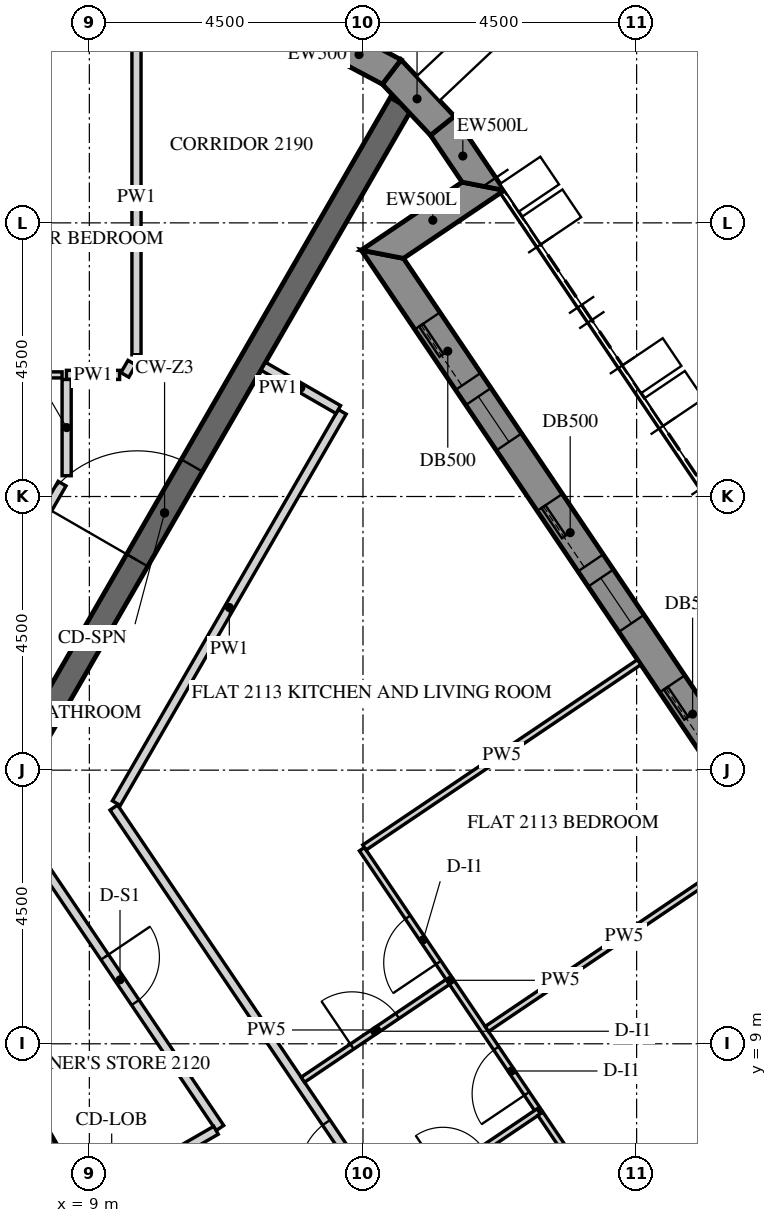
"""IFC4 building model, lengths in metres.
Left out: names, types, materials, properties, quantities, classifications, styles, units other than length and angle.
Written with IfcOpenShell. Run it as: python <this file> out.ifc"""

import sys

from ifc_helpers import new_model, si_unit, direction, frame, frame_2d, origin, place, context, subcontext, project, spatial, polyline, rectangle, outline, extrude, element, fill, save


model = new_model("IFC4")
c1 = context("Model", 3, precision=1e-05, world=origin(), true_north=direction((0.0, 1.0)))
c2 = subcontext(c1, "Body", "Model", "MODEL_VIEW")
j1 = project(units=[si_unit("LENGTHUNIT", "METRE"), si_unit("PLANEANGLEUNIT", "RADIAN")], contexts=[c1])
p1 = place(None, origin())
s1 = spatial("IfcSite", under=j1, at=p1, CompositionType="ELEMENT")
p2 = place(p1, origin())
s2 = spatial("IfcBuilding", under=s1, at=p2, CompositionType="ELEMENT")
p3 = place(p2, frame((0.0, 0.0, 267.9)))
s3 = spatial("IfcBuildingStorey", under=s2, at=p3, CompositionType="ELEMENT", Elevation=267.9)
p4 = place(p3, frame((26.706, 2.879, -0.15), z_axis=(0.0, 0.0, 1.0), x_axis=(-0.559197891507, 0.829034208061, 0.0)))
e1 = element("IfcWall", 1, at=p4, inside=s3, PredefinedType="SOLIDWALL", context=c2, shape_type="SweptSolid", body=[
    extrude(outline(polyline([(0.25, -0.25), (22.795, -0.25), (23.295, 0.25), (-0.25, 0.25), (0.25, -0.25)])), origin(), (0.0, 0.0, 1.0), 3.9),
])
p5 = place(p4, frame((1.323, 0.0, 1.05)))
e2 = element("IfcOpeningElement", 2, at=p5, cuts=e1, PredefinedType="OPENING", context=c2, shape_type="SweptSolid", body=[
    extrude(rectangle(XDim=0.9, YDim=1.5, at=frame_2d((0.45, 0.75))), frame((0.0, 0.26, 0.0), z_axis=(0.0, -1.0, 0.0), x_axis=(1.0, 0.0, 0.0)), (0.0, 0.0, 1.0), 0.52),
])
p6 = place(p4, frame((2.522, 0.0, 0.15)))
e3 = element("IfcOpeningElement", 3, at=p6, cuts=e1, PredefinedType="OPENING", context=c2, shape_type="SweptSolid", body=[
    extrude(rectangle(XDim=1.2, YDim=2.4, at=frame_2d((0.6, 1.2))), frame((0.0, 0.26, 0.0), z_axis=(0.0, -1.0, 0.0), x_axis=(1.0, 0.0, 0.0)), (0.0, 0.0, 1.0), 0.52),
])
p7 = place(p4, frame((4.922, 0.0, 1.05)))
e4 = element("IfcOpeningElement", 4, at=p7, cuts=e1, PredefinedType="OPENING", context=c2, shape_type="SweptSolid", body=[
    extrude(rectangle(XDim=0.9, YDim=1.5, at=frame_2d((0.45, 0.75))), frame((0.0, 0.26, 0.0), z_axis=(0.0, -1.0, 0.0), x_axis=(1.0, 0.0, 0.0)), (0.0, 0.0, 1.0), 0.52),
])
p8 = place(p4, frame((6.122, 0.0, 0.15)))
e5 = element("IfcOpeningElement", 5, at=p8, cuts=e1, PredefinedType="OPENING", context=c2, shape_type="SweptSolid", body=[
    extrude(rectangle(XDim=1.2, YDim=2.4, at=frame_2d((0.6, 1.2))), frame((0.0, 0.26, 0.0), z_axis=(0.0, -1.0, 0.0), x_axis=(1.0, 0.0, 0.0)), (0.0, 0.0, 1.0), 0.52),
])
p9 = place(p4, frame((8.522, 0.0, 1.05)))
e6 = element("IfcOpeningElement", 6, at=p9, cuts=e1, PredefinedType="OPENING", context=c2, shape_type="SweptSolid", body=[
    extrude(rectangle(XDim=0.9, YDim=1.5, at=frame_2d((0.45, 0.75))), frame((0.0, 0.26, 0.0), z_axis=(0.0, -1.0, 0.0), x_axis=(1.0, 0.0, 0.0)), (0.0, 0.0, 1.0), 0.52),
])
p10 = place(p4, frame((9.722, 0.0, 0.15)))
e7 = element("IfcOpeningElement", 7, at=p10, cuts=e1, PredefinedType="OPENING", context=c2, shape_type="SweptSolid", body=[
    extrude(rectangle(XDim=1.2, YDim=2.4, at=frame_2d((0.6, 1.2))), frame((0.0, 0.26, 0.0), z_axis=(0.0, -1.0, 0.0), x_axis=(1.0, 0.0, 0.0)), (0.0, 0.0, 1.0), 0.52),
])
p11 = place(p4, frame((12.122, 0.0, 1.05)))
e8 = element("IfcOpeningElement", 8, at=p11, cuts=e1, PredefinedType="OPENING", context=c2, shape_type="SweptSolid", body=[
    extrude(rectangle(XDim=0.9, YDim=1.5, at=frame_2d((0.45, 0.75))), frame((0.0, 0.26, 0.0), z_axis=(0.0, -1.0, 0.0), x_axis=(1.0, 0.0, 0.0)), (0.0, 0.0, 1.0), 0.52),
])
p12 = place(p4, frame((13.323, 0.0, 0.15)))
e9 = element("IfcOpeningElement", 9, at=p12, cuts=e1, PredefinedType="OPENING", context=c2, shape_type="SweptSolid", body=[
    extrude(rectangle(XDim=1.2, YDim=2.4, at=frame_2d((0.6, 1.2))), frame((0.0, 0.26, 0.0), z_axis=(0.0, -1.0, 0.0), x_axis=(1.0, 0.0, 0.0)), (0.0, 0.0, 1.0), 0.52),
])
p13 = place(p4, frame((15.722, 0.0, 1.05)))
e10 = element("IfcOpeningElement", 10, at=p13, cuts=e1, PredefinedType="OPENING", context=c2, shape_type="SweptSolid", body=[
    extrude(rectangle(XDim=0.9, YDim=1.5, at=frame_2d((0.45, 0.75))), frame((0.0, 0.26, 0.0), z_axis=(0.0, -1.0, 0.0), x_axis=(1.0, 0.0, 0.0)), (0.0, 0.0, 1.0), 0.52),
])
p14 = place(p4, frame((16.922, 0.0, 0.15)))
e11 = element("IfcOpeningElement", 11, at=p14, cuts=e1, PredefinedType="OPENING", context=c2, shape_type="SweptSolid", body=[
    extrude(rectangle(XDim=1.2, YDim=2.4, at=frame_2d((0.6, 1.2))), frame((0.0, 0.26, 0.0), z_axis=(0.0, -1.0, 0.0), x_axis=(1.0, 0.0, 0.0)), (0.0, 0.0, 1.0), 0.52),
])
p15 = place(p4, frame((19.323, 0.0, 1.05)))
e12 = element("IfcOpeningElement", 12, at=p15, cuts=e1, PredefinedType="OPENING", context=c2, shape_type="SweptSolid", body=[
    extrude(rectangle(XDim=0.9, YDim=1.5, at=frame_2d((0.45, 0.75))), frame((0.0, 0.26, 0.0), z_axis=(0.0, -1.0, 0.0), x_axis=(1.0, 0.0, 0.0)), (0.0, 0.0, 1.0), 0.52),
])
p16 = place(p4, frame((20.522, 0.0, 0.15)))
e13 = element("IfcOpeningElement", 13, at=p16, cuts=e1, PredefinedType="OPENING", context=c2, shape_type="SweptSolid", body=[
    extrude(rectangle(XDim=1.2, YDim=2.4, at=frame_2d((0.6, 1.2))), frame((0.0, 0.26, 0.0), z_axis=(0.0, -1.0, 0.0), x_axis=(1.0, 0.0, 0.0)), (0.0, 0.0, 1.0), 0.52),
])
p17 = place(p3, frame((13.819, 21.984, -0.15), z_axis=(0.0, 0.0, 1.0), x_axis=(0.829052389485, 0.559170935841, 0.0)))
e14 = element("IfcWall", 14, at=p17, inside=s3, PredefinedType="SOLIDWALL", context=c2, shape_type="SweptSolid", body=[
    extrude(outline(polyline([(0.25, -0.25), (2.25, -0.25), (1.75, 0.25), (-0.25, 0.25), (0.25, -0.25)])), origin(), (0.0, 0.0, 1.0), 3.9),
])
p18 = place(p3, frame((15.478, 23.102, -0.15), z_axis=(0.0, 0.0, 1.0), x_axis=(-0.559245726333, 0.829001940636, 0.0)))
e15 = element("IfcWall", 15, at=p18, inside=s3, PredefinedType="SOLIDWALL", context=c2, shape_type="SweptSolid", body=[
    extrude(outline(polyline([(-0.25, -0.25), (1.221, -0.25), (1.18, 0.25), (0.25, 0.25), (-0.25, -0.25)])), origin(), (0.0, 0.0, 1.0), 3.9),
])
p19 = place(p3, frame((14.806, 24.097, -0.15), z_axis=(0.0, 0.0, 1.0), x_axis=(-0.686234452793, 0.727380420275, 0.0)))
e16 = element("IfcWall", 16, at=p19, inside=s3, PredefinedType="SOLIDWALL", context=c2, shape_type="SweptSolid", body=[
    extrude(outline(polyline([(-0.021, -0.25), (1.257, -0.25), (1.175, 0.25), (0.021, 0.25), (-0.021, -0.25)])), origin(), (0.0, 0.0, 1.0), 3.9),
])
p20 = place(p3, frame((13.972, 24.982, -0.15), z_axis=(0.0, 0.0, 1.0), x_axis=(-0.882902492938, 0.469556373575, 0.0)))
e17 = element("IfcWall", 17, at=p20, inside=s3, PredefinedType="SOLIDWALL", context=c2, shape_type="SweptSolid", body=[
    extrude(outline(polyline([(-0.041, -0.25), (1.257, -0.25), (1.175, 0.25), (0.041, 0.25), (-0.041, -0.25)])), origin(), (0.0, 0.0, 1.0), 3.9),
])
p21 = place(p3, frame((12.471, 0.0, -0.15), z_axis=(0.0, 0.0, 1.0), x_axis=(-0.499996419489, 0.866027470984, 0.0)))
e18 = element("IfcWall", 18, at=p21, inside=s3, PredefinedType="SHEAR", context=c2, shape_type="SweptSolid", body=[
    extrude(outline(polyline([(-0.115, -0.2), (12.586, -0.2), (12.355, 0.2), (0.115, 0.2), (-0.115, -0.2)])), origin(), (0.0, 0.0, 1.0), 3.9),
])
p22 = place(p21, frame((5.306, 0.0, 0.15)))
e19 = element("IfcOpeningElement", 19, at=p22, cuts=e18, PredefinedType="OPENING", context=c2, shape_type="SweptSolid", body=[
    extrude(rectangle(XDim=1.8, YDim=2.4, at=frame_2d((0.9, 1.2))), frame((0.0, 0.21, 0.0), z_axis=(0.0, -1.0, 0.0), x_axis=(1.0, 0.0, 0.0)), (0.0, 0.0, 1.0), 0.42),
])
p23 = place(p3, frame((6.351, 11.0, -0.15), z_axis=(0.0, 0.0, 1.0), x_axis=(0.499998894578, 0.866026041999, 0.0)))
e20 = element("IfcWall", 20, at=p23, inside=s3, PredefinedType="SHEAR", context=c2, shape_type="SweptSolid", body=[
    extrude(rectangle(XDim=15.544, YDim=0.4, at=frame_2d((7.772, 0.0))), origin(), (0.0, 0.0, 1.0), 3.9),
])
p24 = place(p23, frame((6.872, 0.0, 0.15)))
e21 = element("IfcOpeningElement", 21, at=p24, cuts=e20, PredefinedType="OPENING", context=c2, shape_type="SweptSolid", body=[
    extrude(rectangle(XDim=1.8, YDim=2.4, at=frame_2d((0.9, 1.2))), frame((0.0, 0.21, 0.0), z_axis=(0.0, -1.0, 0.0), x_axis=(1.0, 0.0, 0.0)), (0.0, 0.0, 1.0), 0.42),
])
p25 = place(p3, frame((9.775, 25.5, 0.0), z_axis=(0.0, 0.0, 1.0), x_axis=(0.0, -1.0, 0.0)))
e22 = element("IfcWall", 22, at=p25, inside=s3, PredefinedType="PARTITIONING", context=c2, shape_type="SweptSolid", body=[
    extrude(rectangle(XDim=5.169, YDim=0.15, at=frame_2d((2.584, 0.0))), origin(), (0.0, 0.0, 1.0), 2.988),
])
p26 = place(p3, frame((9.7, 20.201, 0.0), z_axis=(0.0, 0.0, 1.0), x_axis=(-0.500207565094, -0.865905532852, 0.0)))
e23 = element("IfcWall", 23, at=p26, inside=s3, PredefinedType="PARTITIONING", context=c2, shape_type="SweptSolid", body=[
    extrude(rectangle(XDim=0.232, YDim=0.15, at=frame_2d((0.116, 0.0))), origin(), (0.0, 0.0, 1.0), 2.988),
])
p27 = place(p3, frame((9.497, 20.0, 0.0), z_axis=(0.0, 0.0, 1.0), x_axis=(-1.0, 0.0, 0.0)))
e24 = element("IfcWall", 24, at=p27, inside=s3, PredefinedType="PARTITIONING", context=c2, shape_type="SweptSolid", body=[
    extrude(rectangle(XDim=0.874, YDim=0.15, at=frame_2d((0.437, 0.0))), origin(), (0.0, 0.0, 1.0), 2.988),
])
p28 = place(p3, frame((8.627, 19.925, 0.0), z_axis=(0.0, 0.0, 1.0), x_axis=(0.0, -1.0, 0.0)))
e25 = element("IfcWall", 25, at=p28, inside=s3, PredefinedType="PARTITIONING", context=c2, shape_type="SweptSolid", body=[
    extrude(rectangle(XDim=1.583, YDim=0.15, at=frame_2d((0.792, 0.0))), origin(), (0.0, 0.0, 1.0), 2.988),
])
p29 = place(p3, frame((8.552, 18.212, 0.0), z_axis=(0.0, 0.0, 1.0), x_axis=(-0.499959175164, -0.866048972731, 0.0)))
e26 = element("IfcWall", 26, at=p29, inside=s3, PredefinedType="PARTITIONING", context=c2, shape_type="SweptSolid", body=[
    extrude(rectangle(XDim=2.53, YDim=0.15, at=frame_2d((1.265, 0.0))), origin(), (0.0, 0.0, 1.0), 2.988),
])
p30 = place(p3, frame((18.875, -1.158, 0.0), z_axis=(0.0, 0.0, 1.0), x_axis=(-0.55919880344, 0.829033592945, 0.0)))
e27 = element("IfcWall", 27, at=p30, inside=s3, PredefinedType="PARTITIONING", context=c2, shape_type="SweptSolid", body=[
    extrude(rectangle(XDim=16.939, YDim=0.15, at=frame_2d((8.47, 0.0))), origin(), (0.0, 0.0, 1.0), 2.988),
])
p31 = place(p30, frame((9.69, 0.0, 0.0)))
e28 = element("IfcOpeningElement", 28, at=p31, cuts=e27, PredefinedType="OPENING", context=c2, shape_type="SweptSolid", body=[
    extrude(rectangle(XDim=1.0, YDim=2.1, at=frame_2d((0.5, 1.05))), frame((0.0, 0.085, 0.0), z_axis=(0.0, -1.0, 0.0), x_axis=(1.0, 0.0, 0.0)), (0.0, 0.0, 1.0), 0.17),
])
p32 = place(p3, frame((9.444, 12.957, 0.0), z_axis=(0.0, 0.0, 1.0), x_axis=(0.500004967958, 0.866022535513, 0.0)))
e29 = element("IfcWall", 29, at=p32, inside=s3, PredefinedType="PARTITIONING", context=c2, shape_type="SweptSolid", body=[
    extrude(rectangle(XDim=7.431, YDim=0.15, at=frame_2d((3.715, 0.0))), origin(), (0.0, 0.0, 1.0), 2.988),
])
p33 = place(p3, frame((13.094, 19.43, 0.0), z_axis=(0.0, 0.0, 1.0), x_axis=(-0.866062911188, 0.499935029643, 0.0)))
e30 = element("IfcWall", 30, at=p33, inside=s3, PredefinedType="PARTITIONING", context=c2, shape_type="SweptSolid", body=[
    extrude(rectangle(XDim=1.425, YDim=0.15, at=frame_2d((0.712, 0.0))), origin(), (0.0, 0.0, 1.0), 2.988),
])
p34 = place(p3, frame((7.861, 12.488, 0.0), z_axis=(0.0, 0.0, 1.0), x_axis=(0.559178186788, -0.829047498893, 0.0)))
e31 = element("IfcWall", 31, at=p34, inside=s3, PredefinedType="PARTITIONING", context=c2, shape_type="SweptSolid", body=[
    extrude(rectangle(XDim=5.878, YDim=0.15, at=frame_2d((2.939, 0.0))), origin(), (0.0, 0.0, 1.0), 2.988),
])
p35 = place(p34, frame((2.489, 0.0, 0.0)))
e32 = element("IfcOpeningElement", 32, at=p35, cuts=e31, PredefinedType="OPENING", context=c2, shape_type="SweptSolid", body=[
    extrude(rectangle(XDim=0.9, YDim=2.1, at=frame_2d((0.45, 1.05))), frame((0.0, 0.085, 0.0), z_axis=(0.0, -1.0, 0.0), x_axis=(1.0, 0.0, 0.0)), (0.0, 0.0, 1.0), 0.17),
])
p36 = place(p3, frame((11.082, 7.578, 0.0), z_axis=(0.0, 0.0, 1.0), x_axis=(-0.865993065409, -0.500056007527, 0.0)))
e33 = element("IfcWall", 33, at=p36, inside=s3, PredefinedType="PARTITIONING", context=c2, shape_type="SweptSolid", body=[
    extrude(rectangle(XDim=2.386, YDim=0.15, at=frame_2d((1.193, 0.0))), origin(), (0.0, 0.0, 1.0), 2.988),
])
p37 = place(p3, frame((6.677, 20.0, 0.0), z_axis=(0.0, 0.0, 1.0), x_axis=(1.0, 0.0, 0.0)))
e34 = element("IfcWall", 34, at=p37, inside=s3, PredefinedType="PARTITIONING", context=c2, shape_type="SweptSolid", body=[
    extrude(rectangle(XDim=1.875, YDim=0.1, at=frame_2d((0.938, 0.0))), origin(), (0.0, 0.0, 1.0), 2.988),
])
p38 = place(p3, frame((22.069, 9.307, 0.0), z_axis=(0.0, 0.0, 1.0), x_axis=(-0.829046823816, -0.559179187668, 0.0)))
e35 = element("IfcWall", 35, at=p38, inside=s3, PredefinedType="PARTITIONING", context=c2, shape_type="SweptSolid", body=[
    extrude(rectangle(XDim=8.425, YDim=0.18, at=frame_2d((4.213, 0.0))), origin(), (0.0, 0.0, 1.0), 2.988),
])
p39 = place(p3, frame((12.511, 8.409, 0.0), z_axis=(0.0, 0.0, 1.0), x_axis=(0.829072128826, 0.559141668278, 0.0)))
e36 = element("IfcWall", 36, at=p39, inside=s3, PredefinedType="PARTITIONING", context=c2, shape_type="SweptSolid", body=[
    extrude(rectangle(XDim=2.925, YDim=0.1, at=frame_2d((1.462, 0.0))), origin(), (0.0, 0.0, 1.0), 2.988),
])
p40 = place(p39, frame((0.975, 0.0, 0.0)))
e37 = element("IfcOpeningElement", 37, at=p40, cuts=e36, PredefinedType="OPENING", context=c2, shape_type="SweptSolid", body=[
    extrude(rectangle(XDim=0.9, YDim=2.1, at=frame_2d((0.45, 1.05))), frame((0.0, 0.06, 0.0), z_axis=(0.0, -1.0, 0.0), x_axis=(1.0, 0.0, 0.0)), (0.0, 0.0, 1.0), 0.12),
])
p41 = place(p3, frame((16.392, 7.888, 0.0), z_axis=(0.0, 0.0, 1.0), x_axis=(-0.559208437152, 0.829027094743, 0.0)))
e38 = element("IfcWall", 38, at=p41, inside=s3, PredefinedType="PARTITIONING", context=c2, shape_type="SweptSolid", body=[
    extrude(rectangle(XDim=5.202, YDim=0.1, at=frame_2d((2.601, 0.0))), origin(), (0.0, 0.0, 1.0), 2.988),
])
p42 = place(p41, frame((0.352, 0.0, 0.0)))
e39 = element("IfcOpeningElement", 39, at=p42, cuts=e38, PredefinedType="OPENING", context=c2, shape_type="SweptSolid", body=[
    extrude(rectangle(XDim=0.9, YDim=2.1, at=frame_2d((0.45, 1.05))), frame((0.0, 0.06, 0.0), z_axis=(0.0, -1.0, 0.0), x_axis=(1.0, 0.0, 0.0)), (0.0, 0.0, 1.0), 0.12),
])
p43 = place(p41, frame((2.952, 0.0, 0.0)))
e40 = element("IfcOpeningElement", 40, at=p43, cuts=e38, PredefinedType="OPENING", context=c2, shape_type="SweptSolid", body=[
    extrude(rectangle(XDim=0.9, YDim=2.1, at=frame_2d((0.45, 1.05))), frame((0.0, 0.06, 0.0), z_axis=(0.0, -1.0, 0.0), x_axis=(1.0, 0.0, 0.0)), (0.0, 0.0, 1.0), 0.12),
])
p44 = place(p3, frame((13.524, 12.229, 0.0), z_axis=(0.0, 0.0, 1.0), x_axis=(0.829026245862, 0.559209695617, 0.0)))
e41 = element("IfcWall", 41, at=p44, inside=s3, PredefinedType="PARTITIONING", context=c2, shape_type="SweptSolid", body=[
    extrude(rectangle(XDim=5.45, YDim=0.1, at=frame_2d((2.725, 0.0))), origin(), (0.0, 0.0, 1.0), 2.988),
])
p45 = place(p3, frame((13.966, 6.254, 0.0), z_axis=(0.0, 0.0, 1.0), x_axis=(0.829046031219, 0.559180362781, 0.0)))
e42 = element("IfcWall", 42, at=p45, inside=s3, PredefinedType="PARTITIONING", context=c2, shape_type="SweptSolid", body=[
    extrude(rectangle(XDim=2.925, YDim=0.1, at=frame_2d((1.462, 0.0))), origin(), (0.0, 0.0, 1.0), 2.988),
])
p46 = place(p45, frame((1.025, 0.0, 0.0)))
e43 = element("IfcOpeningElement", 43, at=p46, cuts=e42, PredefinedType="OPENING", context=c2, shape_type="SweptSolid", body=[
    extrude(rectangle(XDim=0.8, YDim=2.1, at=frame_2d((0.4, 1.05))), frame((0.0, 0.06, 0.0), z_axis=(0.0, -1.0, 0.0), x_axis=(1.0, 0.0, 0.0)), (0.0, 0.0, 1.0), 0.12),
])
p47 = place(p3, frame((17.458, 6.306, 0.0), z_axis=(0.0, 0.0, 1.0), x_axis=(-0.559200351269, 0.829032548903, 0.0)))
e44 = element("IfcWall", 44, at=p47, inside=s3, PredefinedType="PARTITIONING", context=c2, shape_type="SweptSolid", body=[
    extrude(rectangle(XDim=1.862, YDim=0.1, at=frame_2d((0.931, 0.0))), origin(), (0.0, 0.0, 1.0), 2.988),
])
p48 = place(p3, frame((20.055, 12.292, 0.0), z_axis=(0.0, 0.0, 1.0), x_axis=(-0.829040254016, -0.559188928021, 0.0)))
e45 = element("IfcWall", 45, at=p48, inside=s3, PredefinedType="PARTITIONING", context=c2, shape_type="SweptSolid", body=[
    extrude(rectangle(XDim=5.45, YDim=0.1, at=frame_2d((2.725, 0.0))), origin(), (0.0, 0.0, 1.0), 2.988),
])
p49 = place(p12, frame((0.0, 0.175, 0.0)))
e46 = element("IfcDoor", 46, at=p49, inside=s3, OperationType="SLIDING_TO_LEFT", PredefinedType="DOOR", context=c2, shape_type="SweptSolid", body=[
    extrude(rectangle(XDim=1.2, YDim=2.4, at=frame_2d((0.6, 1.2))), frame((0.0, 0.025, 0.0), z_axis=(0.0, -1.0, 0.0), x_axis=(1.0, 0.0, 0.0)), (0.0, 0.0, 1.0), 0.05),
])
fill(e9, e46)
p50 = place(p13, frame((0.0, 0.18, 0.0)))
e47 = element("IfcWindow", 47, at=p50, inside=s3, PartitioningType="SINGLE_PANEL", PredefinedType="WINDOW", context=c2, shape_type="SweptSolid", body=[
    extrude(rectangle(XDim=0.9, YDim=1.5, at=frame_2d((0.45, 0.75))), frame((0.0, 0.03, 0.0), z_axis=(0.0, -1.0, 0.0), x_axis=(1.0, 0.0, 0.0)), (0.0, 0.0, 1.0), 0.06),
])
fill(e10, e47)
p51 = place(p14, frame((0.0, 0.175, 0.0)))
e48 = element("IfcDoor", 48, at=p51, inside=s3, OperationType="SLIDING_TO_LEFT", PredefinedType="DOOR", context=c2, shape_type="SweptSolid", body=[
    extrude(rectangle(XDim=1.2, YDim=2.4, at=frame_2d((0.6, 1.2))), frame((0.0, 0.025, 0.0), z_axis=(0.0, -1.0, 0.0), x_axis=(1.0, 0.0, 0.0)), (0.0, 0.0, 1.0), 0.05),
])
fill(e11, e48)
p52 = place(p15, frame((0.0, 0.18, 0.0)))
e49 = element("IfcWindow", 49, at=p52, inside=s3, PartitioningType="SINGLE_PANEL", PredefinedType="WINDOW", context=c2, shape_type="SweptSolid", body=[
    extrude(rectangle(XDim=0.9, YDim=1.5, at=frame_2d((0.45, 0.75))), frame((0.0, 0.03, 0.0), z_axis=(0.0, -1.0, 0.0), x_axis=(1.0, 0.0, 0.0)), (0.0, 0.0, 1.0), 0.06),
])
fill(e12, e49)
p53 = place(p16, frame((0.0, 0.175, 0.0)))
e50 = element("IfcDoor", 50, at=p53, inside=s3, OperationType="SLIDING_TO_LEFT", PredefinedType="DOOR", context=c2, shape_type="SweptSolid", body=[
    extrude(rectangle(XDim=1.2, YDim=2.4, at=frame_2d((0.6, 1.2))), frame((0.0, 0.025, 0.0), z_axis=(0.0, -1.0, 0.0), x_axis=(1.0, 0.0, 0.0)), (0.0, 0.0, 1.0), 0.05),
])
fill(e13, e50)
p54 = place(p24, origin())
e51 = element("IfcDoor", 51, at=p54, inside=s3, OperationType="DOUBLE_DOOR_SINGLE_SWING", PredefinedType="DOOR", context=c2, shape_type="SweptSolid", body=[
    extrude(rectangle(XDim=1.8, YDim=2.4, at=frame_2d((0.9, 1.2))), frame((0.0, 0.025, 0.0), z_axis=(0.0, -1.0, 0.0), x_axis=(1.0, 0.0, 0.0)), (0.0, 0.0, 1.0), 0.05),
])
fill(e21, e51)
p55 = place(p31, origin())
e52 = element("IfcDoor", 52, at=p55, inside=s3, OperationType="SINGLE_SWING_RIGHT", PredefinedType="DOOR", context=c2, shape_type="SweptSolid", body=[
    extrude(rectangle(XDim=1.0, YDim=2.1, at=frame_2d((0.5, 1.05))), frame((0.0, 0.025, 0.0), z_axis=(0.0, -1.0, 0.0), x_axis=(1.0, 0.0, 0.0)), (0.0, 0.0, 1.0), 0.05),
])
fill(e28, e52)
p56 = place(p40, origin())
e53 = element("IfcDoor", 53, at=p56, inside=s3, OperationType="SINGLE_SWING_RIGHT", PredefinedType="DOOR", context=c2, shape_type="SweptSolid", body=[
    extrude(rectangle(XDim=0.9, YDim=2.1, at=frame_2d((0.45, 1.05))), frame((0.0, 0.025, 0.0), z_axis=(0.0, -1.0, 0.0), x_axis=(1.0, 0.0, 0.0)), (0.0, 0.0, 1.0), 0.05),
])
fill(e37, e53)
p57 = place(p42, origin())
e54 = element("IfcDoor", 54, at=p57, inside=s3, OperationType="SINGLE_SWING_LEFT", PredefinedType="DOOR", context=c2, shape_type="SweptSolid", body=[
    extrude(rectangle(XDim=0.9, YDim=2.1, at=frame_2d((0.45, 1.05))), frame((0.0, 0.025, 0.0), z_axis=(0.0, -1.0, 0.0), x_axis=(1.0, 0.0, 0.0)), (0.0, 0.0, 1.0), 0.05),
])
fill(e39, e54)
p58 = place(p43, origin())
e55 = element("IfcDoor", 55, at=p58, inside=s3, OperationType="SINGLE_SWING_RIGHT", PredefinedType="DOOR", context=c2, shape_type="SweptSolid", body=[
    extrude(rectangle(XDim=0.9, YDim=2.1, at=frame_2d((0.45, 1.05))), frame((0.0, 0.025, 0.0), z_axis=(0.0, -1.0, 0.0), x_axis=(1.0, 0.0, 0.0)), (0.0, 0.0, 1.0), 0.05),
])
fill(e40, e55)
p59 = place(p35, origin())
e56 = element("IfcDoor", 56, at=p59, inside=s3, OperationType="SINGLE_SWING_RIGHT", PredefinedType="DOOR", context=c2, shape_type="SweptSolid", body=[
    extrude(rectangle(XDim=0.9, YDim=2.1, at=frame_2d((0.45, 1.05))), frame((0.0, 0.025, 0.0), z_axis=(0.0, -1.0, 0.0), x_axis=(1.0, 0.0, 0.0)), (0.0, 0.0, 1.0), 0.05),
])
fill(e32, e56)
save(model, sys.argv[1])
